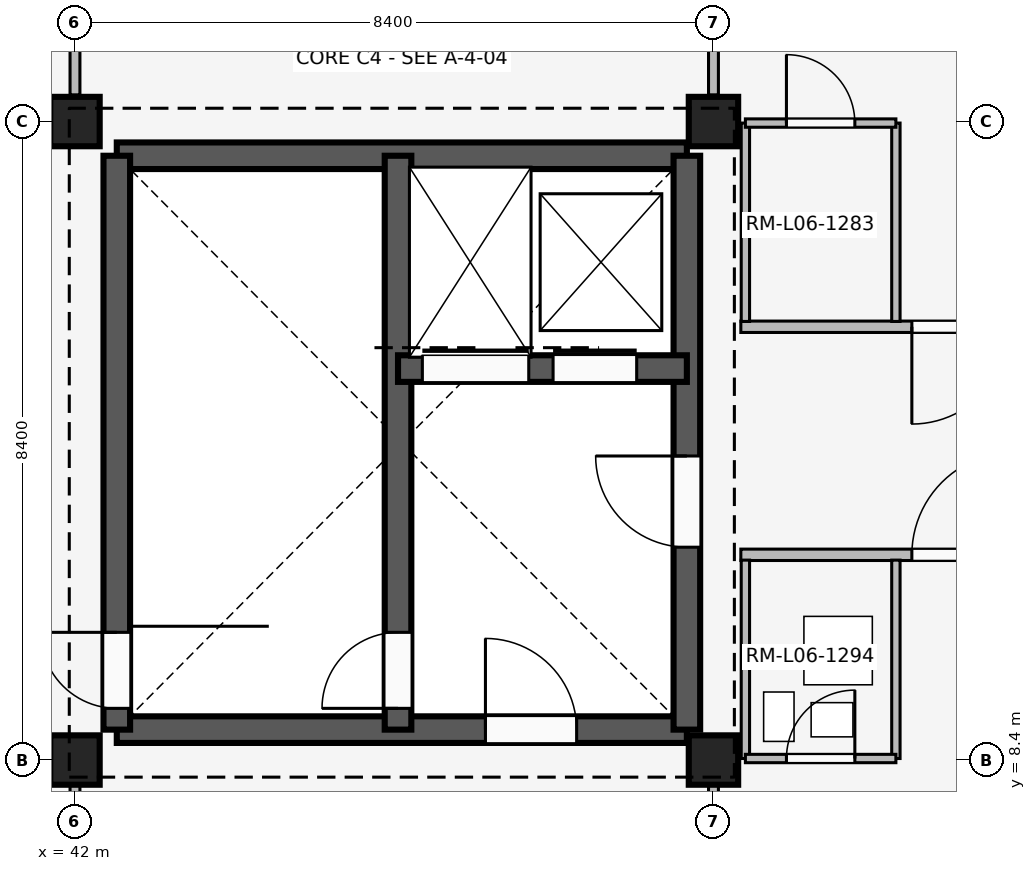
"""IFC4 building model, lengths in metres.
Left out: names, types, materials, properties, quantities, classifications, styles, units other than length and angle.
Written with IfcOpenShell. Run it as: python <this file> out.ifc"""

import sys

from ifc_helpers import new_model, si_unit, direction, frame, frame_2d, origin, origin_2d, place, context, subcontext, project, spatial, rectangle, extrude, element, fill, save


model = new_model("IFC4")
c1 = context("Model", 3, precision=1e-05, world=origin(), true_north=direction((0.0, 1.0)))
c2 = subcontext(c1, "Body", "Model", "MODEL_VIEW")
j1 = project(units=[si_unit("LENGTHUNIT", "METRE"), si_unit("PLANEANGLEUNIT", "RADIAN")], contexts=[c1])
p1 = place(None, origin())
s1 = spatial("IfcSite", under=j1, at=p1, CompositionType="ELEMENT")
p2 = place(p1, origin())
s2 = spatial("IfcBuilding", under=s1, at=p2, CompositionType="ELEMENT")
p3 = place(p2, frame((0.0, 0.0, 24.6)))
s3 = spatial("IfcBuildingStorey", under=s2, at=p3, CompositionType="ELEMENT", Elevation=24.6)
for number, where, z_axis, x_axis in (
    (1, (42.0, 8.4, 0.0), (0.0, 0.0, 1.0), (1.0, 0.0, 0.0)),
    (2, (42.0, 16.8, 0.0), (0.0, 0.0, 1.0), (1.0, 0.0, 0.0)),
    (3, (50.4, 8.4, 0.0), (0.0, 0.0, 1.0), (1.0, 0.0, 0.0)),
    (4, (50.4, 16.8, 0.0), (0.0, 0.0, 1.0), (1.0, 0.0, 0.0)),
):
    element("IfcColumn", number, at=place(p3, frame(where, z_axis=z_axis, x_axis=x_axis)), inside=s3, PredefinedType="COLUMN", context=c2, shape_type="SweptSolid", body=[
        extrude(rectangle(XDim=0.65, YDim=0.65, at=origin_2d()), origin(), (0.0, 0.0, 1.0), 4.2),
    ])
p4 = place(p3, frame((42.55, 8.8, 0.0), z_axis=(0.0, 0.0, 1.0), x_axis=(1.0, 0.0, 0.0)))
e5 = element("IfcWall", 5, at=p4, inside=s3, PredefinedType="SHEAR", context=c2, shape_type="SweptSolid", body=[
    extrude(rectangle(XDim=7.5, YDim=0.35, at=frame_2d((3.75, 0.0))), origin(), (0.0, 0.0, 1.0), 3.92),
])
p5 = place(p4, frame((4.85, 0.0, 0.0)))
e6 = element("IfcOpeningElement", 6, at=p5, cuts=e5, PredefinedType="OPENING", context=c2, shape_type="SweptSolid", body=[
    extrude(rectangle(XDim=1.2, YDim=2.2, at=frame_2d((0.6, 1.1))), frame((0.0, 0.185, 0.0), z_axis=(0.0, -1.0, 0.0), x_axis=(1.0, 0.0, 0.0)), (0.0, 0.0, 1.0), 0.37),
])
p6 = place(p3, frame((42.55, 16.35, 0.0), z_axis=(0.0, 0.0, 1.0), x_axis=(1.0, 0.0, 0.0)))
e7 = element("IfcWall", 7, at=p6, inside=s3, PredefinedType="SHEAR", context=c2, shape_type="SweptSolid", body=[
    extrude(rectangle(XDim=7.5, YDim=0.35, at=frame_2d((3.75, 0.0))), origin(), (0.0, 0.0, 1.0), 3.92),
])
p7 = place(p3, frame((42.55, 8.8, 0.0), z_axis=(0.0, 0.0, 1.0), x_axis=(0.0, 1.0, 0.0)))
e8 = element("IfcWall", 8, at=p7, inside=s3, PredefinedType="SHEAR", context=c2, shape_type="SweptSolid", body=[
    extrude(rectangle(XDim=7.55, YDim=0.35, at=frame_2d((3.775, 0.0))), origin(), (0.0, 0.0, 1.0), 3.92),
])
p8 = place(p7, frame((0.28, 0.0, 0.0)))
e9 = element("IfcOpeningElement", 9, at=p8, cuts=e8, PredefinedType="OPENING", context=c2, shape_type="SweptSolid", body=[
    extrude(rectangle(XDim=1.0, YDim=2.15, at=frame_2d((0.5, 1.075))), frame((0.0, 0.185, 0.0), z_axis=(0.0, -1.0, 0.0), x_axis=(1.0, 0.0, 0.0)), (0.0, 0.0, 1.0), 0.37),
])
p9 = place(p3, frame((50.05, 8.8, 0.0), z_axis=(0.0, 0.0, 1.0), x_axis=(0.0, 1.0, 0.0)))
e10 = element("IfcWall", 10, at=p9, inside=s3, PredefinedType="SHEAR", context=c2, shape_type="SweptSolid", body=[
    extrude(rectangle(XDim=7.55, YDim=0.35, at=frame_2d((3.775, 0.0))), origin(), (0.0, 0.0, 1.0), 3.92),
])
p10 = place(p9, frame((2.4, 0.0, 0.0)))
e11 = element("IfcOpeningElement", 11, at=p10, cuts=e10, PredefinedType="OPENING", context=c2, shape_type="SweptSolid", body=[
    extrude(rectangle(XDim=1.2, YDim=2.2, at=frame_2d((0.6, 1.1))), frame((0.0, 0.185, 0.0), z_axis=(0.0, -1.0, 0.0), x_axis=(1.0, 0.0, 0.0)), (0.0, 0.0, 1.0), 0.37),
])
p11 = place(p3, frame((46.25, 8.8, 0.0), z_axis=(0.0, 0.0, 1.0), x_axis=(0.0, 1.0, 0.0)))
e12 = element("IfcWall", 12, at=p11, inside=s3, PredefinedType="SHEAR", context=c2, shape_type="SweptSolid", body=[
    extrude(rectangle(XDim=7.55, YDim=0.35, at=frame_2d((3.775, 0.0))), origin(), (0.0, 0.0, 1.0), 3.92),
])
p12 = place(p11, frame((0.28, 0.0, 0.0)))
e13 = element("IfcOpeningElement", 13, at=p12, cuts=e12, PredefinedType="OPENING", context=c2, shape_type="SweptSolid", body=[
    extrude(rectangle(XDim=1.0, YDim=2.15, at=frame_2d((0.5, 1.075))), frame((0.0, 0.185, 0.0), z_axis=(0.0, -1.0, 0.0), x_axis=(1.0, 0.0, 0.0)), (0.0, 0.0, 1.0), 0.37),
])
p13 = place(p3, frame((46.25, 13.55, 0.0), z_axis=(0.0, 0.0, 1.0), x_axis=(1.0, 0.0, 0.0)))
e14 = element("IfcWall", 14, at=p13, inside=s3, PredefinedType="SHEAR", context=c2, shape_type="SweptSolid", body=[
    extrude(rectangle(XDim=3.8, YDim=0.35, at=frame_2d((1.9, 0.0))), origin(), (0.0, 0.0, 1.0), 3.92),
])
p14 = place(p13, frame((0.32, 0.0, 0.0)))
e15 = element("IfcOpeningElement", 15, at=p14, cuts=e14, PredefinedType="OPENING", context=c2, shape_type="SweptSolid", body=[
    extrude(rectangle(XDim=1.4, YDim=2.25, at=frame_2d((0.7, 1.125))), frame((0.0, 0.185, 0.0), z_axis=(0.0, -1.0, 0.0), x_axis=(1.0, 0.0, 0.0)), (0.0, 0.0, 1.0), 0.37),
])
p15 = place(p13, frame((2.04, 0.0, 0.0)))
e16 = element("IfcOpeningElement", 16, at=p15, cuts=e14, PredefinedType="OPENING", context=c2, shape_type="SweptSolid", body=[
    extrude(rectangle(XDim=1.1, YDim=2.15, at=frame_2d((0.55, 1.075))), frame((0.0, 0.185, 0.0), z_axis=(0.0, -1.0, 0.0), x_axis=(1.0, 0.0, 0.0)), (0.0, 0.0, 1.0), 0.37),
])
p16 = place(p3, frame((42.0, 0.14, 0.0), z_axis=(0.0, 0.0, 1.0), x_axis=(0.0, 1.0, 0.0)))
e17 = element("IfcWall", 17, at=p16, inside=s3, PredefinedType="PARTITIONING", context=c2, shape_type="SweptSolid", body=[
    extrude(rectangle(XDim=8.21, YDim=0.13, at=frame_2d((4.105, 0.0))), origin(), (0.0, 0.0, 1.0), 3.32),
])
p17 = place(p16, frame((3.64, 0.0, 0.0)))
e18 = element("IfcOpeningElement", 18, at=p17, cuts=e17, PredefinedType="OPENING", context=c2, shape_type="SweptSolid", body=[
    extrude(rectangle(XDim=1.08, YDim=2.15, at=frame_2d((0.54, 1.075))), frame((0.0, 0.075, 0.0), z_axis=(0.0, -1.0, 0.0), x_axis=(1.0, 0.0, 0.0)), (0.0, 0.0, 1.0), 0.15),
])
p18 = place(p3, frame((42.0, 17.15, 0.0), z_axis=(0.0, 0.0, 1.0), x_axis=(0.0, 1.0, 0.0)))
e19 = element("IfcWall", 19, at=p18, inside=s3, PredefinedType="PARTITIONING", context=c2, shape_type="SweptSolid", body=[
    extrude(rectangle(XDim=7.91, YDim=0.13, at=frame_2d((3.955, 0.0))), origin(), (0.0, 0.0, 1.0), 3.32),
])
p19 = place(p18, frame((3.4, 0.0, 0.0)))
e20 = element("IfcOpeningElement", 20, at=p19, cuts=e19, PredefinedType="OPENING", context=c2, shape_type="SweptSolid", body=[
    extrude(rectangle(XDim=1.05, YDim=2.2, at=frame_2d((0.525, 1.1))), frame((0.0, 0.075, 0.0), z_axis=(0.0, -1.0, 0.0), x_axis=(1.0, 0.0, 0.0)), (0.0, 0.0, 1.0), 0.15),
])
p20 = place(p3, frame((50.4, 0.14, 0.0), z_axis=(0.0, 0.0, 1.0), x_axis=(0.0, 1.0, 0.0)))
e21 = element("IfcWall", 21, at=p20, inside=s3, PredefinedType="PARTITIONING", context=c2, shape_type="SweptSolid", body=[
    extrude(rectangle(XDim=8.21, YDim=0.13, at=frame_2d((4.105, 0.0))), origin(), (0.0, 0.0, 1.0), 3.32),
])
p21 = place(p20, frame((3.64, 0.0, 0.0)))
e22 = element("IfcOpeningElement", 22, at=p21, cuts=e21, PredefinedType="OPENING", context=c2, shape_type="SweptSolid", body=[
    extrude(rectangle(XDim=1.08, YDim=2.15, at=frame_2d((0.54, 1.075))), frame((0.0, 0.075, 0.0), z_axis=(0.0, -1.0, 0.0), x_axis=(1.0, 0.0, 0.0)), (0.0, 0.0, 1.0), 0.15),
])
p22 = place(p3, frame((50.4, 17.15, 0.0), z_axis=(0.0, 0.0, 1.0), x_axis=(0.0, 1.0, 0.0)))
e23 = element("IfcWall", 23, at=p22, inside=s3, PredefinedType="PARTITIONING", context=c2, shape_type="SweptSolid", body=[
    extrude(rectangle(XDim=7.91, YDim=0.13, at=frame_2d((3.955, 0.0))), origin(), (0.0, 0.0, 1.0), 3.32),
])
p23 = place(p22, frame((3.4, 0.0, 0.0)))
e24 = element("IfcOpeningElement", 24, at=p23, cuts=e23, PredefinedType="OPENING", context=c2, shape_type="SweptSolid", body=[
    extrude(rectangle(XDim=1.05, YDim=2.2, at=frame_2d((0.525, 1.1))), frame((0.0, 0.075, 0.0), z_axis=(0.0, -1.0, 0.0), x_axis=(1.0, 0.0, 0.0)), (0.0, 0.0, 1.0), 0.15),
])
p24 = place(p3, frame((50.76, 11.1, 0.0), z_axis=(0.0, 0.0, 1.0), x_axis=(1.0, 0.0, 0.0)))
e25 = element("IfcWall", 25, at=p24, inside=s3, PredefinedType="PARTITIONING", context=c2, shape_type="SweptSolid", body=[
    extrude(rectangle(XDim=7.96, YDim=0.15, at=frame_2d((3.98, 0.0))), origin(), (0.0, 0.0, 1.0), 3.32),
])
p25 = place(p24, frame((2.25, 0.0, 0.0)))
e26 = element("IfcOpeningElement", 26, at=p25, cuts=e25, PredefinedType="OPENING", context=c2, shape_type="SweptSolid", body=[
    extrude(rectangle(XDim=1.35, YDim=2.25, at=frame_2d((0.675, 1.125))), frame((0.0, 0.085, 0.0), z_axis=(0.0, -1.0, 0.0), x_axis=(1.0, 0.0, 0.0)), (0.0, 0.0, 1.0), 0.17),
])
p26 = place(p24, frame((5.95, 0.0, 0.0)))
e27 = element("IfcOpeningElement", 27, at=p26, cuts=e25, PredefinedType="OPENING", context=c2, shape_type="SweptSolid", body=[
    extrude(rectangle(XDim=1.35, YDim=2.25, at=frame_2d((0.675, 1.125))), frame((0.0, 0.085, 0.0), z_axis=(0.0, -1.0, 0.0), x_axis=(1.0, 0.0, 0.0)), (0.0, 0.0, 1.0), 0.17),
])
for number, where, z_axis, x_axis in (
    (28, (50.82, 8.42, 0.0), (0.0, 0.0, 1.0), (0.0, 1.0, 0.0)),
    (29, (52.8, 8.42, 0.0), (0.0, 0.0, 1.0), (0.0, 1.0, 0.0)),
):
    element("IfcWall", number, at=place(p3, frame(where, z_axis=z_axis, x_axis=x_axis)), inside=s3, PredefinedType="PARTITIONING", context=c2, shape_type="SweptSolid", body=[
        extrude(rectangle(XDim=2.61, YDim=0.11, at=frame_2d((1.305, 0.0))), origin(), (0.0, 0.0, 1.0), 3.32),
    ])
p27 = place(p3, frame((50.82, 8.42, 0.0), z_axis=(0.0, 0.0, 1.0), x_axis=(1.0, 0.0, 0.0)))
e30 = element("IfcWall", 30, at=p27, inside=s3, PredefinedType="PARTITIONING", context=c2, shape_type="SweptSolid", body=[
    extrude(rectangle(XDim=1.98, YDim=0.11, at=frame_2d((0.99, 0.0))), origin(), (0.0, 0.0, 1.0), 3.32),
])
p28 = place(p27, frame((0.54, 0.0, 0.0)))
e31 = element("IfcOpeningElement", 31, at=p28, cuts=e30, PredefinedType="OPENING", context=c2, shape_type="SweptSolid", body=[
    extrude(rectangle(XDim=0.9, YDim=2.1, at=frame_2d((0.45, 1.05))), frame((0.0, 0.065, 0.0), z_axis=(0.0, -1.0, 0.0), x_axis=(1.0, 0.0, 0.0)), (0.0, 0.0, 1.0), 0.13),
])
p29 = place(p3, frame((58.72, 14.1, 0.0), z_axis=(0.0, 0.0, 1.0), x_axis=(-1.0, 0.0, 0.0)))
e32 = element("IfcWall", 32, at=p29, inside=s3, PredefinedType="PARTITIONING", context=c2, shape_type="SweptSolid", body=[
    extrude(rectangle(XDim=7.96, YDim=0.15, at=frame_2d((3.98, 0.0))), origin(), (0.0, 0.0, 1.0), 3.32),
])
p30 = place(p29, frame((0.73, 0.0, 0.0)))
e33 = element("IfcOpeningElement", 33, at=p30, cuts=e32, PredefinedType="OPENING", context=c2, shape_type="SweptSolid", body=[
    extrude(rectangle(XDim=1.28, YDim=2.2, at=frame_2d((0.64, 1.1))), frame((0.0, 0.085, 0.0), z_axis=(0.0, -1.0, 0.0), x_axis=(1.0, 0.0, 0.0)), (0.0, 0.0, 1.0), 0.17),
])
p31 = place(p29, frame((4.43, 0.0, 0.0)))
e34 = element("IfcOpeningElement", 34, at=p31, cuts=e32, PredefinedType="OPENING", context=c2, shape_type="SweptSolid", body=[
    extrude(rectangle(XDim=1.28, YDim=2.2, at=frame_2d((0.64, 1.1))), frame((0.0, 0.085, 0.0), z_axis=(0.0, -1.0, 0.0), x_axis=(1.0, 0.0, 0.0)), (0.0, 0.0, 1.0), 0.17),
])
for number, where, z_axis, x_axis in (
    (35, (50.82, 14.17, 0.0), (0.0, 0.0, 1.0), (0.0, 1.0, 0.0)),
    (36, (52.8, 14.17, 0.0), (0.0, 0.0, 1.0), (0.0, 1.0, 0.0)),
):
    element("IfcWall", number, at=place(p3, frame(where, z_axis=z_axis, x_axis=x_axis)), inside=s3, PredefinedType="PARTITIONING", context=c2, shape_type="SweptSolid", body=[
        extrude(rectangle(XDim=2.61, YDim=0.11, at=frame_2d((1.305, 0.0))), origin(), (0.0, 0.0, 1.0), 3.32),
    ])
p32 = place(p3, frame((50.82, 16.78, 0.0), z_axis=(0.0, 0.0, 1.0), x_axis=(1.0, 0.0, 0.0)))
e37 = element("IfcWall", 37, at=p32, inside=s3, PredefinedType="PARTITIONING", context=c2, shape_type="SweptSolid", body=[
    extrude(rectangle(XDim=1.98, YDim=0.11, at=frame_2d((0.99, 0.0))), origin(), (0.0, 0.0, 1.0), 3.32),
])
p33 = place(p32, frame((0.54, 0.0, 0.0)))
e38 = element("IfcOpeningElement", 38, at=p33, cuts=e37, PredefinedType="OPENING", context=c2, shape_type="SweptSolid", body=[
    extrude(rectangle(XDim=0.9, YDim=2.1, at=frame_2d((0.45, 1.05))), frame((0.0, 0.065, 0.0), z_axis=(0.0, -1.0, 0.0), x_axis=(1.0, 0.0, 0.0)), (0.0, 0.0, 1.0), 0.13),
])
p34 = place(p10, origin())
e39 = element("IfcDoor", 39, at=p34, inside=s3, OperationType="SINGLE_SWING_RIGHT", PredefinedType="DOOR", context=c2, shape_type="SweptSolid", body=[
    extrude(rectangle(XDim=1.2, YDim=2.2, at=frame_2d((0.6, 1.1))), frame((0.0, 0.025, 0.0), z_axis=(0.0, -1.0, 0.0), x_axis=(1.0, 0.0, 0.0)), (0.0, 0.0, 1.0), 0.05),
])
fill(e11, e39)
p35 = place(p5, origin())
e40 = element("IfcDoor", 40, at=p35, inside=s3, OperationType="SINGLE_SWING_LEFT", PredefinedType="DOOR", context=c2, shape_type="SweptSolid", body=[
    extrude(rectangle(XDim=1.2, YDim=2.2, at=frame_2d((0.6, 1.1))), frame((0.0, 0.025, 0.0), z_axis=(0.0, -1.0, 0.0), x_axis=(1.0, 0.0, 0.0)), (0.0, 0.0, 1.0), 0.05),
])
fill(e6, e40)
p36 = place(p8, origin())
e41 = element("IfcDoor", 41, at=p36, inside=s3, OperationType="SINGLE_SWING_RIGHT", PredefinedType="DOOR", context=c2, shape_type="SweptSolid", body=[
    extrude(rectangle(XDim=1.0, YDim=2.15, at=frame_2d((0.5, 1.075))), frame((0.0, 0.025, 0.0), z_axis=(0.0, -1.0, 0.0), x_axis=(1.0, 0.0, 0.0)), (0.0, 0.0, 1.0), 0.05),
])
fill(e9, e41)
p37 = place(p12, origin())
e42 = element("IfcDoor", 42, at=p37, inside=s3, OperationType="SINGLE_SWING_LEFT", PredefinedType="DOOR", context=c2, shape_type="SweptSolid", body=[
    extrude(rectangle(XDim=1.0, YDim=2.15, at=frame_2d((0.5, 1.075))), frame((0.0, 0.025, 0.0), z_axis=(0.0, -1.0, 0.0), x_axis=(1.0, 0.0, 0.0)), (0.0, 0.0, 1.0), 0.05),
])
fill(e13, e42)
p38 = place(p14, origin())
e43 = element("IfcDoor", 43, at=p38, inside=s3, OperationType="SLIDING_TO_LEFT", PredefinedType="DOOR", context=c2, shape_type="SweptSolid", body=[
    extrude(rectangle(XDim=1.4, YDim=2.25, at=frame_2d((0.7, 1.125))), frame((0.0, 0.025, 0.0), z_axis=(0.0, -1.0, 0.0), x_axis=(1.0, 0.0, 0.0)), (0.0, 0.0, 1.0), 0.05),
])
fill(e15, e43)
p39 = place(p15, origin())
e44 = element("IfcDoor", 44, at=p39, inside=s3, OperationType="SLIDING_TO_LEFT", PredefinedType="DOOR", context=c2, shape_type="SweptSolid", body=[
    extrude(rectangle(XDim=1.1, YDim=2.15, at=frame_2d((0.55, 1.075))), frame((0.0, 0.025, 0.0), z_axis=(0.0, -1.0, 0.0), x_axis=(1.0, 0.0, 0.0)), (0.0, 0.0, 1.0), 0.05),
])
fill(e16, e44)
p40 = place(p25, origin())
e45 = element("IfcDoor", 45, at=p40, inside=s3, OperationType="SINGLE_SWING_RIGHT", PredefinedType="DOOR", context=c2, shape_type="SweptSolid", body=[
    extrude(rectangle(XDim=1.35, YDim=2.25, at=frame_2d((0.675, 1.125))), frame((0.0, 0.025, 0.0), z_axis=(0.0, -1.0, 0.0), x_axis=(1.0, 0.0, 0.0)), (0.0, 0.0, 1.0), 0.05),
])
fill(e26, e45)
p41 = place(p28, origin())
e46 = element("IfcDoor", 46, at=p41, inside=s3, OperationType="SINGLE_SWING_RIGHT", PredefinedType="DOOR", context=c2, shape_type="SweptSolid", body=[
    extrude(rectangle(XDim=0.9, YDim=2.1, at=frame_2d((0.45, 1.05))), frame((0.0, 0.025, 0.0), z_axis=(0.0, -1.0, 0.0), x_axis=(1.0, 0.0, 0.0)), (0.0, 0.0, 1.0), 0.05),
])
fill(e31, e46)
p42 = place(p31, origin())
e47 = element("IfcDoor", 47, at=p42, inside=s3, OperationType="SINGLE_SWING_RIGHT", PredefinedType="DOOR", context=c2, shape_type="SweptSolid", body=[
    extrude(rectangle(XDim=1.28, YDim=2.2, at=frame_2d((0.64, 1.1))), frame((0.0, 0.025, 0.0), z_axis=(0.0, -1.0, 0.0), x_axis=(1.0, 0.0, 0.0)), (0.0, 0.0, 1.0), 0.05),
])
fill(e34, e47)
p43 = place(p33, origin())
e48 = element("IfcDoor", 48, at=p43, inside=s3, OperationType="SINGLE_SWING_LEFT", PredefinedType="DOOR", context=c2, shape_type="SweptSolid", body=[
    extrude(rectangle(XDim=0.9, YDim=2.1, at=frame_2d((0.45, 1.05))), frame((0.0, 0.025, 0.0), z_axis=(0.0, -1.0, 0.0), x_axis=(1.0, 0.0, 0.0)), (0.0, 0.0, 1.0), 0.05),
])
fill(e38, e48)
save(model, sys.argv[1])
